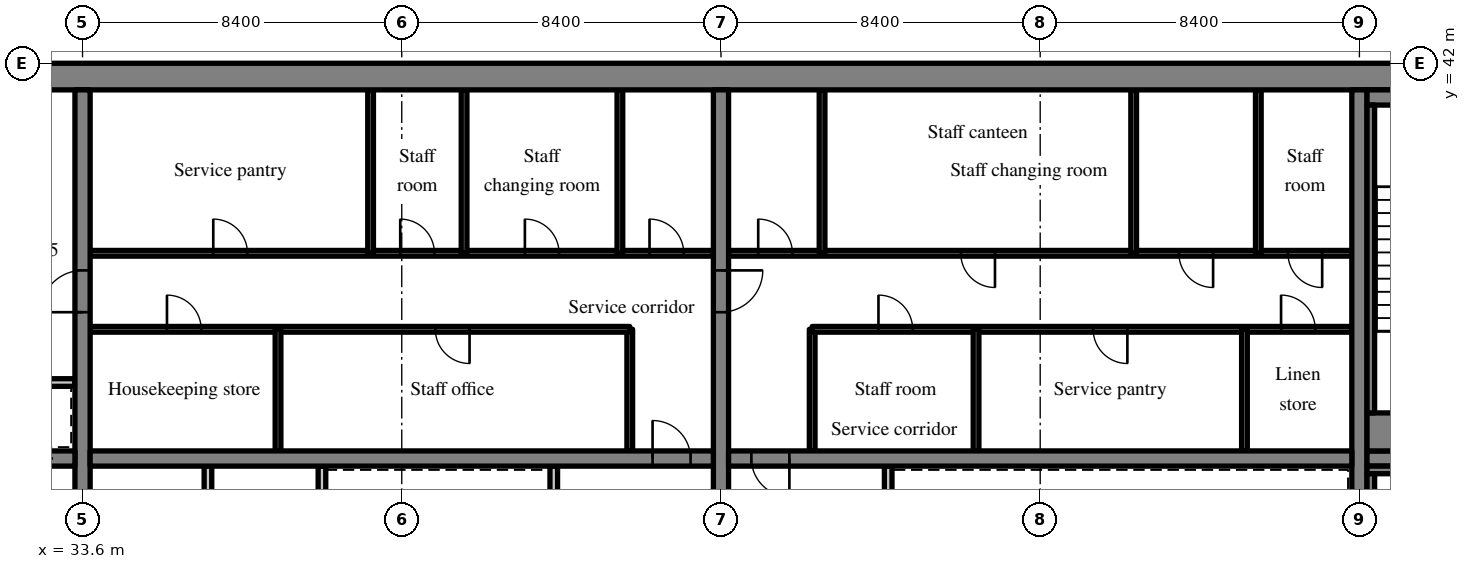
"""IFC4 building model, lengths in metres.
Left out: names, types, materials, properties, quantities, classifications, styles, units other than length and angle.
Written with IfcOpenShell. Run it as: python <this file> out.ifc"""

import sys

from ifc_helpers import new_model, si_unit, direction, frame, frame_2d, origin, place, context, subcontext, project, spatial, rectangle, extrude, source, transform, mapped, element, fill, save


model = new_model("IFC4")
c1 = context("Model", 3, precision=1e-05, world=origin(), true_north=direction((0.0, 1.0)))
c2 = subcontext(c1, "Body", "Model", "MODEL_VIEW")
j1 = project(units=[si_unit("LENGTHUNIT", "METRE"), si_unit("PLANEANGLEUNIT", "RADIAN")], contexts=[c1])
p1 = place(None, origin())
s1 = spatial("IfcSite", under=j1, at=p1, CompositionType="ELEMENT")
p2 = place(p1, origin())
s2 = spatial("IfcBuilding", under=s1, at=p2, CompositionType="ELEMENT")
p3 = place(p2, frame((0.0, 0.0, 170.6)))
s3 = spatial("IfcBuildingStorey", under=s2, at=p3, CompositionType="ELEMENT", Elevation=170.6)
m1 = source(origin(), c2, "Body", "SweptSolid", [
    extrude(rectangle(XDim=50.4, YDim=0.7, at=frame_2d((25.2, 0.0))), origin(), (0.0, 0.0, 1.0), 3.52),
])
p4 = place(p3, frame((25.2, 41.65, 0.0), z_axis=(0.0, 0.0, 1.0), x_axis=(1.0, 0.0, 0.0)))
e1 = element("IfcWall", 1, at=p4, inside=s3, PredefinedType="SHEAR", context=c2, shape_type="MappedRepresentation", body=[
    mapped(m1, transform((0.0, 0.0, 0.0), scale=1.0)),
])
m2 = source(origin(), c2, "Body", "SweptSolid", [
    extrude(rectangle(XDim=18.6, YDim=0.4, at=frame_2d((9.3, 0.0))), origin(), (0.0, 0.0, 1.0), 3.52),
])
p5 = place(p3, frame((33.6, 22.7, 0.0), z_axis=(0.0, 0.0, 1.0), x_axis=(0.0, 1.0, 0.0)))
e2 = element("IfcWall", 2, at=p5, inside=s3, PredefinedType="SHEAR", context=c2, shape_type="MappedRepresentation", body=[
    mapped(m2, transform((0.0, 0.0, 0.0), scale=1.0)),
])
m3 = source(origin(), c2, "Body", "SweptSolid", [
    extrude(rectangle(XDim=1.1, YDim=2.1, at=frame_2d((0.55, 1.05))), frame((0.0, 0.21, 0.0), z_axis=(0.0, -1.0, 0.0), x_axis=(1.0, 0.0, 0.0)), (0.0, 0.0, 1.0), 0.42),
])
p6 = place(p5, frame((12.75, 0.0, 0.0)))
e3 = element("IfcOpeningElement", 3, at=p6, cuts=e2, PredefinedType="OPENING", context=c2, shape_type="MappedRepresentation", body=[
    mapped(m3, transform((0.0, 0.0, 0.0), scale=1.0)),
])
p7 = place(p3, frame((50.4, 22.7, 0.0), z_axis=(0.0, 0.0, 1.0), x_axis=(0.0, 1.0, 0.0)))
e4 = element("IfcWall", 4, at=p7, inside=s3, PredefinedType="SHEAR", context=c2, shape_type="MappedRepresentation", body=[
    mapped(m2, transform((0.0, 0.0, 0.0), scale=1.0)),
])
p8 = place(p7, frame((12.75, 0.0, 0.0)))
e5 = element("IfcOpeningElement", 5, at=p8, cuts=e4, PredefinedType="OPENING", context=c2, shape_type="MappedRepresentation", body=[
    mapped(m3, transform((0.0, 0.0, 0.0), scale=1.0)),
])
p9 = place(p3, frame((67.2, 22.7, 0.0), z_axis=(0.0, 0.0, 1.0), x_axis=(0.0, 1.0, 0.0)))
e6 = element("IfcWall", 6, at=p9, inside=s3, PredefinedType="SHEAR", context=c2, shape_type="MappedRepresentation", body=[
    mapped(m2, transform((0.0, 0.0, 0.0), scale=1.0)),
])
m4 = source(origin(), c2, "Body", "SweptSolid", [
    extrude(rectangle(XDim=7.5, YDim=0.4, at=frame_2d((3.75, 0.0))), origin(), (0.0, 0.0, 1.0), 3.52),
])
p10 = place(p3, frame((25.9, 31.6, 0.0), z_axis=(0.0, 0.0, 1.0), x_axis=(1.0, 0.0, 0.0)))
e7 = element("IfcWall", 7, at=p10, inside=s3, PredefinedType="SHEAR", context=c2, shape_type="MappedRepresentation", body=[
    mapped(m4, transform((0.0, 0.0, 0.0), scale=1.0)),
])
p11 = place(p10, frame((5.825, 0.0, 0.0)))
e8 = element("IfcOpeningElement", 8, at=p11, cuts=e7, PredefinedType="OPENING", context=c2, shape_type="MappedRepresentation", body=[
    mapped(m3, transform((0.0, 0.0, 0.0), scale=1.0)),
])
m5 = source(origin(), c2, "Body", "SweptSolid", [
    extrude(rectangle(XDim=16.4, YDim=0.4, at=frame_2d((8.2, 0.0))), origin(), (0.0, 0.0, 1.0), 3.52),
])
p12 = place(p3, frame((33.8, 31.6, 0.0), z_axis=(0.0, 0.0, 1.0), x_axis=(1.0, 0.0, 0.0)))
e9 = element("IfcWall", 9, at=p12, inside=s3, PredefinedType="SHEAR", context=c2, shape_type="MappedRepresentation", body=[
    mapped(m5, transform((0.0, 0.0, 0.0), scale=1.0)),
])
m6 = source(origin(), c2, "Body", "SweptSolid", [
    extrude(rectangle(XDim=1.0, YDim=2.1, at=frame_2d((0.5, 1.05))), frame((0.0, 0.21, 0.0), z_axis=(0.0, -1.0, 0.0), x_axis=(1.0, 0.0, 0.0)), (0.0, 0.0, 1.0), 0.42),
])
p13 = place(p12, frame((14.8, 0.0, 0.0)))
e10 = element("IfcOpeningElement", 10, at=p13, cuts=e9, PredefinedType="OPENING", context=c2, shape_type="MappedRepresentation", body=[
    mapped(m6, transform((0.0, 0.0, 0.0), scale=1.0)),
])
p14 = place(p3, frame((50.6, 31.6, 0.0), z_axis=(0.0, 0.0, 1.0), x_axis=(1.0, 0.0, 0.0)))
e11 = element("IfcWall", 11, at=p14, inside=s3, PredefinedType="SHEAR", context=c2, shape_type="MappedRepresentation", body=[
    mapped(m5, transform((0.0, 0.0, 0.0), scale=1.0)),
])
p15 = place(p14, frame((0.6, 0.0, 0.0)))
e12 = element("IfcOpeningElement", 12, at=p15, cuts=e11, PredefinedType="OPENING", context=c2, shape_type="MappedRepresentation", body=[
    mapped(m6, transform((0.0, 0.0, 0.0), scale=1.0)),
])
p16 = place(p3, frame((67.4, 31.6, 0.0), z_axis=(0.0, 0.0, 1.0), x_axis=(1.0, 0.0, 0.0)))
e13 = element("IfcWall", 13, at=p16, inside=s3, PredefinedType="SHEAR", context=c2, shape_type="MappedRepresentation", body=[
    mapped(m4, transform((0.0, 0.0, 0.0), scale=1.0)),
])
p17 = place(p16, frame((5.725, 0.0, 0.0)))
e14 = element("IfcOpeningElement", 14, at=p17, cuts=e13, PredefinedType="OPENING", context=c2, shape_type="MappedRepresentation", body=[
    mapped(m3, transform((0.0, 0.0, 0.0), scale=1.0)),
])
m7 = source(origin(), c2, "Body", "SweptSolid", [
    extrude(rectangle(XDim=8.7, YDim=0.2, at=frame_2d((4.35, 0.0))), origin(), (0.0, 0.0, 1.0), 3.52),
])
p18 = place(p3, frame((39.9, 22.7, 0.0), z_axis=(0.0, 0.0, 1.0), x_axis=(0.0, 1.0, 0.0)))
e15 = element("IfcWall", 15, at=p18, inside=s3, PredefinedType="PARTITIONING", context=c2, shape_type="MappedRepresentation", body=[
    mapped(m7, transform((0.0, 0.0, 0.0), scale=1.0)),
])
m8 = source(origin(), c2, "Body", "SweptSolid", [
    extrude(rectangle(XDim=0.9, YDim=2.1, at=frame_2d((0.45, 1.05))), frame((0.0, 0.11, 0.0), z_axis=(0.0, -1.0, 0.0), x_axis=(1.0, 0.0, 0.0)), (0.0, 0.0, 1.0), 0.22),
])
p19 = place(p18, frame((3.85, 0.0, 0.0)))
e16 = element("IfcOpeningElement", 16, at=p19, cuts=e15, PredefinedType="OPENING", context=c2, shape_type="MappedRepresentation", body=[
    mapped(m8, transform((0.0, 0.0, 0.0), scale=1.0)),
])
m9 = source(origin(), c2, "Body", "SweptSolid", [
    extrude(rectangle(XDim=2.6, YDim=0.2, at=frame_2d((1.3, 0.0))), origin(), (0.0, 0.0, 1.0), 3.52),
])
p20 = place(p3, frame((46.0, 28.8, 0.0), z_axis=(0.0, 0.0, 1.0), x_axis=(0.0, 1.0, 0.0)))
e17 = element("IfcWall", 17, at=p20, inside=s3, PredefinedType="SOLIDWALL", context=c2, shape_type="MappedRepresentation", body=[
    mapped(m9, transform((0.0, 0.0, 0.0), scale=1.0)),
])
p21 = place(p3, frame((36.9, 22.7, 0.0), z_axis=(0.0, 0.0, 1.0), x_axis=(0.0, 1.0, 0.0)))
e18 = element("IfcWall", 18, at=p21, inside=s3, PredefinedType="PARTITIONING", context=c2, shape_type="MappedRepresentation", body=[
    mapped(m7, transform((0.0, 0.0, 0.0), scale=1.0)),
])
m10 = source(origin(), c2, "Body", "SweptSolid", [
    extrude(rectangle(XDim=3.2, YDim=0.15, at=frame_2d((1.6, 0.0))), origin(), (0.0, 0.0, 1.0), 3.52),
])
p22 = place(p3, frame((48.0, 31.8, 0.0), z_axis=(0.0, 0.0, 1.0), x_axis=(0.0, 1.0, 0.0)))
e19 = element("IfcWall", 19, at=p22, inside=s3, PredefinedType="PARTITIONING", context=c2, shape_type="MappedRepresentation", body=[
    mapped(m10, transform((0.0, 0.0, 0.0), scale=1.0)),
])
m11 = source(origin(), c2, "Body", "SweptSolid", [
    extrude(rectangle(XDim=14.2, YDim=0.15, at=frame_2d((7.1, 0.0))), origin(), (0.0, 0.0, 1.0), 3.52),
])
p23 = place(p3, frame((33.8, 35.0, 0.0), z_axis=(0.0, 0.0, 1.0), x_axis=(1.0, 0.0, 0.0)))
e20 = element("IfcWall", 20, at=p23, inside=s3, PredefinedType="PARTITIONING", context=c2, shape_type="MappedRepresentation", body=[
    mapped(m11, transform((0.0, 0.0, 0.0), scale=1.0)),
])
m12 = source(origin(), c2, "Body", "SweptSolid", [
    extrude(rectangle(XDim=0.9, YDim=2.1, at=frame_2d((0.45, 1.05))), frame((0.0, 0.085, 0.0), z_axis=(0.0, -1.0, 0.0), x_axis=(1.0, 0.0, 0.0)), (0.0, 0.0, 1.0), 0.17),
])
p24 = place(p23, frame((2.022, 0.0, 0.0)))
e21 = element("IfcOpeningElement", 21, at=p24, cuts=e20, PredefinedType="OPENING", context=c2, shape_type="MappedRepresentation", body=[
    mapped(m12, transform((0.0, 0.0, 0.0), scale=1.0)),
])
p25 = place(p23, frame((9.084, 0.0, 0.0)))
e22 = element("IfcOpeningElement", 22, at=p25, cuts=e20, PredefinedType="OPENING", context=c2, shape_type="MappedRepresentation", body=[
    mapped(m12, transform((0.0, 0.0, 0.0), scale=1.0)),
])
m13 = source(origin(), c2, "Body", "SweptSolid", [
    extrude(rectangle(XDim=16.4, YDim=0.15, at=frame_2d((8.2, 0.0))), origin(), (0.0, 0.0, 1.0), 3.52),
])
p26 = place(p3, frame((33.8, 37.0, 0.0), z_axis=(0.0, 0.0, 1.0), x_axis=(1.0, 0.0, 0.0)))
e23 = element("IfcWall", 23, at=p26, inside=s3, PredefinedType="PARTITIONING", context=c2, shape_type="MappedRepresentation", body=[
    mapped(m13, transform((0.0, 0.0, 0.0), scale=1.0)),
])
p27 = place(p26, frame((3.24, 0.0, 0.0)))
e24 = element("IfcOpeningElement", 24, at=p27, cuts=e23, PredefinedType="OPENING", context=c2, shape_type="MappedRepresentation", body=[
    mapped(m12, transform((0.0, 0.0, 0.0), scale=1.0)),
])
p28 = place(p26, frame((8.16, 0.0, 0.0)))
e25 = element("IfcOpeningElement", 25, at=p28, cuts=e23, PredefinedType="OPENING", context=c2, shape_type="MappedRepresentation", body=[
    mapped(m12, transform((0.0, 0.0, 0.0), scale=1.0)),
])
p29 = place(p26, frame((11.44, 0.0, 0.0)))
e26 = element("IfcOpeningElement", 26, at=p29, cuts=e23, PredefinedType="OPENING", context=c2, shape_type="MappedRepresentation", body=[
    mapped(m12, transform((0.0, 0.0, 0.0), scale=1.0)),
])
p30 = place(p26, frame((14.72, 0.0, 0.0)))
e27 = element("IfcOpeningElement", 27, at=p30, cuts=e23, PredefinedType="OPENING", context=c2, shape_type="MappedRepresentation", body=[
    mapped(m12, transform((0.0, 0.0, 0.0), scale=1.0)),
])
p31 = place(p3, frame((38.744, 31.8, 0.0), z_axis=(0.0, 0.0, 1.0), x_axis=(0.0, 1.0, 0.0)))
e28 = element("IfcWall", 28, at=p31, inside=s3, PredefinedType="PARTITIONING", context=c2, shape_type="MappedRepresentation", body=[
    mapped(m10, transform((0.0, 0.0, 0.0), scale=1.0)),
])
m14 = source(origin(), c2, "Body", "SweptSolid", [
    extrude(rectangle(XDim=4.3, YDim=0.15, at=frame_2d((2.15, 0.0))), origin(), (0.0, 0.0, 1.0), 3.52),
])
for number, where, z_axis, x_axis in (
    (29, (41.18, 37.0, 0.0), (0.0, 0.0, 1.0), (0.0, 1.0, 0.0)),
    (30, (43.64, 37.0, 0.0), (0.0, 0.0, 1.0), (0.0, 1.0, 0.0)),
    (31, (47.74, 37.0, 0.0), (0.0, 0.0, 1.0), (0.0, 1.0, 0.0)),
):
    element("IfcWall", number, at=place(p3, frame(where, z_axis=z_axis, x_axis=x_axis)), inside=s3, PredefinedType="PARTITIONING", context=c2, shape_type="MappedRepresentation", body=[
        mapped(m14, transform((0.0, 0.0, 0.0), scale=1.0)),
    ])
p32 = place(p3, frame((54.8, 28.8, 0.0), z_axis=(0.0, 0.0, 1.0), x_axis=(0.0, 1.0, 0.0)))
e32 = element("IfcWall", 32, at=p32, inside=s3, PredefinedType="SOLIDWALL", context=c2, shape_type="MappedRepresentation", body=[
    mapped(m9, transform((0.0, 0.0, 0.0), scale=1.0)),
])
p33 = place(p3, frame((52.8, 31.8, 0.0), z_axis=(0.0, 0.0, 1.0), x_axis=(0.0, 1.0, 0.0)))
e33 = element("IfcWall", 33, at=p33, inside=s3, PredefinedType="PARTITIONING", context=c2, shape_type="MappedRepresentation", body=[
    mapped(m10, transform((0.0, 0.0, 0.0), scale=1.0)),
])
p34 = place(p3, frame((67.0, 35.0, 0.0), z_axis=(0.0, 0.0, 1.0), x_axis=(-1.0, 0.0, 0.0)))
e34 = element("IfcWall", 34, at=p34, inside=s3, PredefinedType="PARTITIONING", context=c2, shape_type="MappedRepresentation", body=[
    mapped(m11, transform((0.0, 0.0, 0.0), scale=1.0)),
])
p35 = place(p34, frame((0.962, 0.0, 0.0)))
e35 = element("IfcOpeningElement", 35, at=p35, cuts=e34, PredefinedType="OPENING", context=c2, shape_type="MappedRepresentation", body=[
    mapped(m12, transform((0.0, 0.0, 0.0), scale=1.0)),
])
p36 = place(p34, frame((5.906, 0.0, 0.0)))
e36 = element("IfcOpeningElement", 36, at=p36, cuts=e34, PredefinedType="OPENING", context=c2, shape_type="MappedRepresentation", body=[
    mapped(m12, transform((0.0, 0.0, 0.0), scale=1.0)),
])
p37 = place(p34, frame((11.556, 0.0, 0.0)))
e37 = element("IfcOpeningElement", 37, at=p37, cuts=e34, PredefinedType="OPENING", context=c2, shape_type="MappedRepresentation", body=[
    mapped(m12, transform((0.0, 0.0, 0.0), scale=1.0)),
])
p38 = place(p3, frame((67.0, 37.0, 0.0), z_axis=(0.0, 0.0, 1.0), x_axis=(-1.0, 0.0, 0.0)))
e38 = element("IfcWall", 38, at=p38, inside=s3, PredefinedType="PARTITIONING", context=c2, shape_type="MappedRepresentation", body=[
    mapped(m13, transform((0.0, 0.0, 0.0), scale=1.0)),
])
p39 = place(p38, frame((0.78, 0.0, 0.0)))
e39 = element("IfcOpeningElement", 39, at=p39, cuts=e38, PredefinedType="OPENING", context=c2, shape_type="MappedRepresentation", body=[
    mapped(m12, transform((0.0, 0.0, 0.0), scale=1.0)),
])
p40 = place(p38, frame((3.65, 0.0, 0.0)))
e40 = element("IfcOpeningElement", 40, at=p40, cuts=e38, PredefinedType="OPENING", context=c2, shape_type="MappedRepresentation", body=[
    mapped(m12, transform((0.0, 0.0, 0.0), scale=1.0)),
])
p41 = place(p38, frame((9.39, 0.0, 0.0)))
e41 = element("IfcOpeningElement", 41, at=p41, cuts=e38, PredefinedType="OPENING", context=c2, shape_type="MappedRepresentation", body=[
    mapped(m12, transform((0.0, 0.0, 0.0), scale=1.0)),
])
p42 = place(p38, frame((14.72, 0.0, 0.0)))
e42 = element("IfcOpeningElement", 42, at=p42, cuts=e38, PredefinedType="OPENING", context=c2, shape_type="MappedRepresentation", body=[
    mapped(m12, transform((0.0, 0.0, 0.0), scale=1.0)),
])
for number, where, z_axis, x_axis in (
    (43, (64.175, 31.8, 0.0), (0.0, 0.0, 1.0), (0.0, 1.0, 0.0)),
    (44, (57.112, 31.8, 0.0), (0.0, 0.0, 1.0), (0.0, 1.0, 0.0)),
):
    element("IfcWall", number, at=place(p3, frame(where, z_axis=z_axis, x_axis=x_axis)), inside=s3, PredefinedType="PARTITIONING", context=c2, shape_type="MappedRepresentation", body=[
        mapped(m10, transform((0.0, 0.0, 0.0), scale=1.0)),
    ])
for number, where, z_axis, x_axis in (
    (45, (64.54, 37.0, 0.0), (0.0, 0.0, 1.0), (0.0, 1.0, 0.0)),
    (46, (61.26, 37.0, 0.0), (0.0, 0.0, 1.0), (0.0, 1.0, 0.0)),
    (47, (53.06, 37.0, 0.0), (0.0, 0.0, 1.0), (0.0, 1.0, 0.0)),
):
    element("IfcWall", number, at=place(p3, frame(where, z_axis=z_axis, x_axis=x_axis)), inside=s3, PredefinedType="PARTITIONING", context=c2, shape_type="MappedRepresentation", body=[
        mapped(m14, transform((0.0, 0.0, 0.0), scale=1.0)),
    ])
m15 = source(origin(), c2, "Body", "SweptSolid", [
    extrude(rectangle(XDim=2.25, YDim=0.2, at=frame_2d((1.125, 0.0))), origin(), (0.0, 0.0, 1.0), 3.52),
])
p43 = place(p3, frame((31.15, 33.6, 0.0), z_axis=(0.0, 0.0, 1.0), x_axis=(1.0, 0.0, 0.0)))
e48 = element("IfcWall", 48, at=p43, inside=s3, PredefinedType="SOLIDWALL", context=c2, shape_type="MappedRepresentation", body=[
    mapped(m15, transform((0.0, 0.0, 0.0), scale=1.0)),
])
m16 = source(origin(), c2, "Body", "SweptSolid", [
    extrude(rectangle(XDim=4.85, YDim=0.2, at=frame_2d((2.425, 0.0))), origin(), (0.0, 0.0, 1.0), 3.52),
])
p44 = place(p3, frame((67.4, 31.3, 0.0), z_axis=(0.0, 0.0, 1.0), x_axis=(1.0, 0.0, 0.0)))
e49 = element("IfcWall", 49, at=p44, inside=s3, PredefinedType="SOLIDWALL", context=c2, shape_type="MappedRepresentation", body=[
    mapped(m16, transform((0.0, 0.0, 0.0), scale=1.0)),
])
m17 = source(origin(), c2, "Body", "SweptSolid", [
    extrude(rectangle(XDim=8.1, YDim=0.2, at=frame_2d((4.05, 0.0))), origin(), (0.0, 0.0, 1.0), 3.52),
])
p45 = place(p3, frame((67.5, 23.1, 0.0), z_axis=(0.0, 0.0, 1.0), x_axis=(0.0, 1.0, 0.0)))
e50 = element("IfcWall", 50, at=p45, inside=s3, PredefinedType="SOLIDWALL", context=c2, shape_type="MappedRepresentation", body=[
    mapped(m17, transform((0.0, 0.0, 0.0), scale=1.0)),
])
m18 = source(origin(), c2, "Body", "SweptSolid", [
    extrude(rectangle(XDim=4.85, YDim=0.4, at=frame_2d((2.425, 0.0))), origin(), (0.0, 0.0, 1.0), 3.52),
])
p46 = place(p3, frame((67.4, 41.1, 0.0), z_axis=(0.0, 0.0, 1.0), x_axis=(1.0, 0.0, 0.0)))
e51 = element("IfcWall", 51, at=p46, inside=s3, PredefinedType="SOLIDWALL", context=c2, shape_type="MappedRepresentation", body=[
    mapped(m18, transform((0.0, 0.0, 0.0), scale=1.0)),
])
m19 = source(origin(), c2, "Body", "SweptSolid", [
    extrude(rectangle(XDim=4.85, YDim=1.0, at=frame_2d((2.425, 0.0))), origin(), (0.0, 0.0, 1.0), 3.52),
])
p47 = place(p3, frame((67.4, 32.3, 0.0), z_axis=(0.0, 0.0, 1.0), x_axis=(1.0, 0.0, 0.0)))
e52 = element("IfcWall", 52, at=p47, inside=s3, PredefinedType="SOLIDWALL", context=c2, shape_type="MappedRepresentation", body=[
    mapped(m19, transform((0.0, 0.0, 0.0), scale=1.0)),
])
p48 = place(p3, frame((67.5, 32.8, 0.0), z_axis=(0.0, 0.0, 1.0), x_axis=(0.0, 1.0, 0.0)))
e53 = element("IfcWall", 53, at=p48, inside=s3, PredefinedType="SOLIDWALL", context=c2, shape_type="MappedRepresentation", body=[
    mapped(m17, transform((0.0, 0.0, 0.0), scale=1.0)),
])
m20 = source(origin(), c2, "Body", "SweptSolid", [
    extrude(rectangle(XDim=1.0, YDim=2.1, at=frame_2d((0.5, 1.05))), frame((0.0, 0.025, 0.0), z_axis=(0.0, -1.0, 0.0), x_axis=(1.0, 0.0, 0.0)), (0.0, 0.0, 1.0), 0.05),
])
p49 = place(p13, origin())
e54 = element("IfcDoor", 54, at=p49, inside=s3, OperationType="SINGLE_SWING_LEFT", PredefinedType="DOOR", context=c2, shape_type="MappedRepresentation", body=[
    mapped(m20, transform((0.0, 0.0, 0.0), scale=1.0)),
])
fill(e10, e54)
m21 = source(origin(), c2, "Body", "SweptSolid", [
    extrude(rectangle(XDim=0.9, YDim=2.1, at=frame_2d((0.45, 1.05))), frame((0.0, 0.025, 0.0), z_axis=(0.0, -1.0, 0.0), x_axis=(1.0, 0.0, 0.0)), (0.0, 0.0, 1.0), 0.05),
])
p50 = place(p24, origin())
e55 = element("IfcDoor", 55, at=p50, inside=s3, OperationType="SINGLE_SWING_LEFT", PredefinedType="DOOR", context=c2, shape_type="MappedRepresentation", body=[
    mapped(m21, transform((0.0, 0.0, 0.0), scale=1.0)),
])
fill(e21, e55)
p51 = place(p25, origin())
e56 = element("IfcDoor", 56, at=p51, inside=s3, OperationType="SINGLE_SWING_RIGHT", PredefinedType="DOOR", context=c2, shape_type="MappedRepresentation", body=[
    mapped(m21, transform((0.0, 0.0, 0.0), scale=1.0)),
])
fill(e22, e56)
p52 = place(p27, origin())
e57 = element("IfcDoor", 57, at=p52, inside=s3, OperationType="SINGLE_SWING_LEFT", PredefinedType="DOOR", context=c2, shape_type="MappedRepresentation", body=[
    mapped(m21, transform((0.0, 0.0, 0.0), scale=1.0)),
])
fill(e24, e57)
p53 = place(p28, origin())
e58 = element("IfcDoor", 58, at=p53, inside=s3, OperationType="SINGLE_SWING_LEFT", PredefinedType="DOOR", context=c2, shape_type="MappedRepresentation", body=[
    mapped(m21, transform((0.0, 0.0, 0.0), scale=1.0)),
])
fill(e25, e58)
p54 = place(p29, origin())
e59 = element("IfcDoor", 59, at=p54, inside=s3, OperationType="SINGLE_SWING_LEFT", PredefinedType="DOOR", context=c2, shape_type="MappedRepresentation", body=[
    mapped(m21, transform((0.0, 0.0, 0.0), scale=1.0)),
])
fill(e26, e59)
p55 = place(p30, origin())
e60 = element("IfcDoor", 60, at=p55, inside=s3, OperationType="SINGLE_SWING_LEFT", PredefinedType="DOOR", context=c2, shape_type="MappedRepresentation", body=[
    mapped(m21, transform((0.0, 0.0, 0.0), scale=1.0)),
])
fill(e27, e60)
p56 = place(p15, origin())
e61 = element("IfcDoor", 61, at=p56, inside=s3, OperationType="SINGLE_SWING_RIGHT", PredefinedType="DOOR", context=c2, shape_type="MappedRepresentation", body=[
    mapped(m20, transform((0.0, 0.0, 0.0), scale=1.0)),
])
fill(e12, e61)
p57 = place(p35, origin())
e62 = element("IfcDoor", 62, at=p57, inside=s3, OperationType="SINGLE_SWING_RIGHT", PredefinedType="DOOR", context=c2, shape_type="MappedRepresentation", body=[
    mapped(m21, transform((0.0, 0.0, 0.0), scale=1.0)),
])
fill(e35, e62)
p58 = place(p36, origin())
e63 = element("IfcDoor", 63, at=p58, inside=s3, OperationType="SINGLE_SWING_LEFT", PredefinedType="DOOR", context=c2, shape_type="MappedRepresentation", body=[
    mapped(m21, transform((0.0, 0.0, 0.0), scale=1.0)),
])
fill(e36, e63)
p59 = place(p37, origin())
e64 = element("IfcDoor", 64, at=p59, inside=s3, OperationType="SINGLE_SWING_RIGHT", PredefinedType="DOOR", context=c2, shape_type="MappedRepresentation", body=[
    mapped(m21, transform((0.0, 0.0, 0.0), scale=1.0)),
])
fill(e37, e64)
p60 = place(p39, origin())
e65 = element("IfcDoor", 65, at=p60, inside=s3, OperationType="SINGLE_SWING_LEFT", PredefinedType="DOOR", context=c2, shape_type="MappedRepresentation", body=[
    mapped(m21, transform((0.0, 0.0, 0.0), scale=1.0)),
])
fill(e39, e65)
p61 = place(p40, origin())
e66 = element("IfcDoor", 66, at=p61, inside=s3, OperationType="SINGLE_SWING_LEFT", PredefinedType="DOOR", context=c2, shape_type="MappedRepresentation", body=[
    mapped(m21, transform((0.0, 0.0, 0.0), scale=1.0)),
])
fill(e40, e66)
p62 = place(p41, origin())
e67 = element("IfcDoor", 67, at=p62, inside=s3, OperationType="SINGLE_SWING_LEFT", PredefinedType="DOOR", context=c2, shape_type="MappedRepresentation", body=[
    mapped(m21, transform((0.0, 0.0, 0.0), scale=1.0)),
])
fill(e41, e67)
p63 = place(p42, origin())
e68 = element("IfcDoor", 68, at=p63, inside=s3, OperationType="SINGLE_SWING_RIGHT", PredefinedType="DOOR", context=c2, shape_type="MappedRepresentation", body=[
    mapped(m21, transform((0.0, 0.0, 0.0), scale=1.0)),
])
fill(e42, e68)
m22 = source(origin(), c2, "Body", "SweptSolid", [
    extrude(rectangle(XDim=1.1, YDim=2.1, at=frame_2d((0.55, 1.05))), frame((0.0, 0.025, 0.0), z_axis=(0.0, -1.0, 0.0), x_axis=(1.0, 0.0, 0.0)), (0.0, 0.0, 1.0), 0.05),
])
p64 = place(p11, origin())
e69 = element("IfcDoor", 69, at=p64, inside=s3, OperationType="SLIDING_TO_LEFT", PredefinedType="DOOR", context=c2, shape_type="MappedRepresentation", body=[
    mapped(m22, transform((0.0, 0.0, 0.0), scale=1.0)),
])
fill(e8, e69)
p65 = place(p6, origin())
e70 = element("IfcDoor", 70, at=p65, inside=s3, OperationType="SINGLE_SWING_LEFT", PredefinedType="DOOR", context=c2, shape_type="MappedRepresentation", body=[
    mapped(m22, transform((0.0, 0.0, 0.0), scale=1.0)),
])
fill(e3, e70)
p66 = place(p8, origin())
e71 = element("IfcDoor", 71, at=p66, inside=s3, OperationType="SINGLE_SWING_RIGHT", PredefinedType="DOOR", context=c2, shape_type="MappedRepresentation", body=[
    mapped(m22, transform((0.0, 0.0, 0.0), scale=1.0)),
])
fill(e5, e71)
save(model, sys.argv[1])
